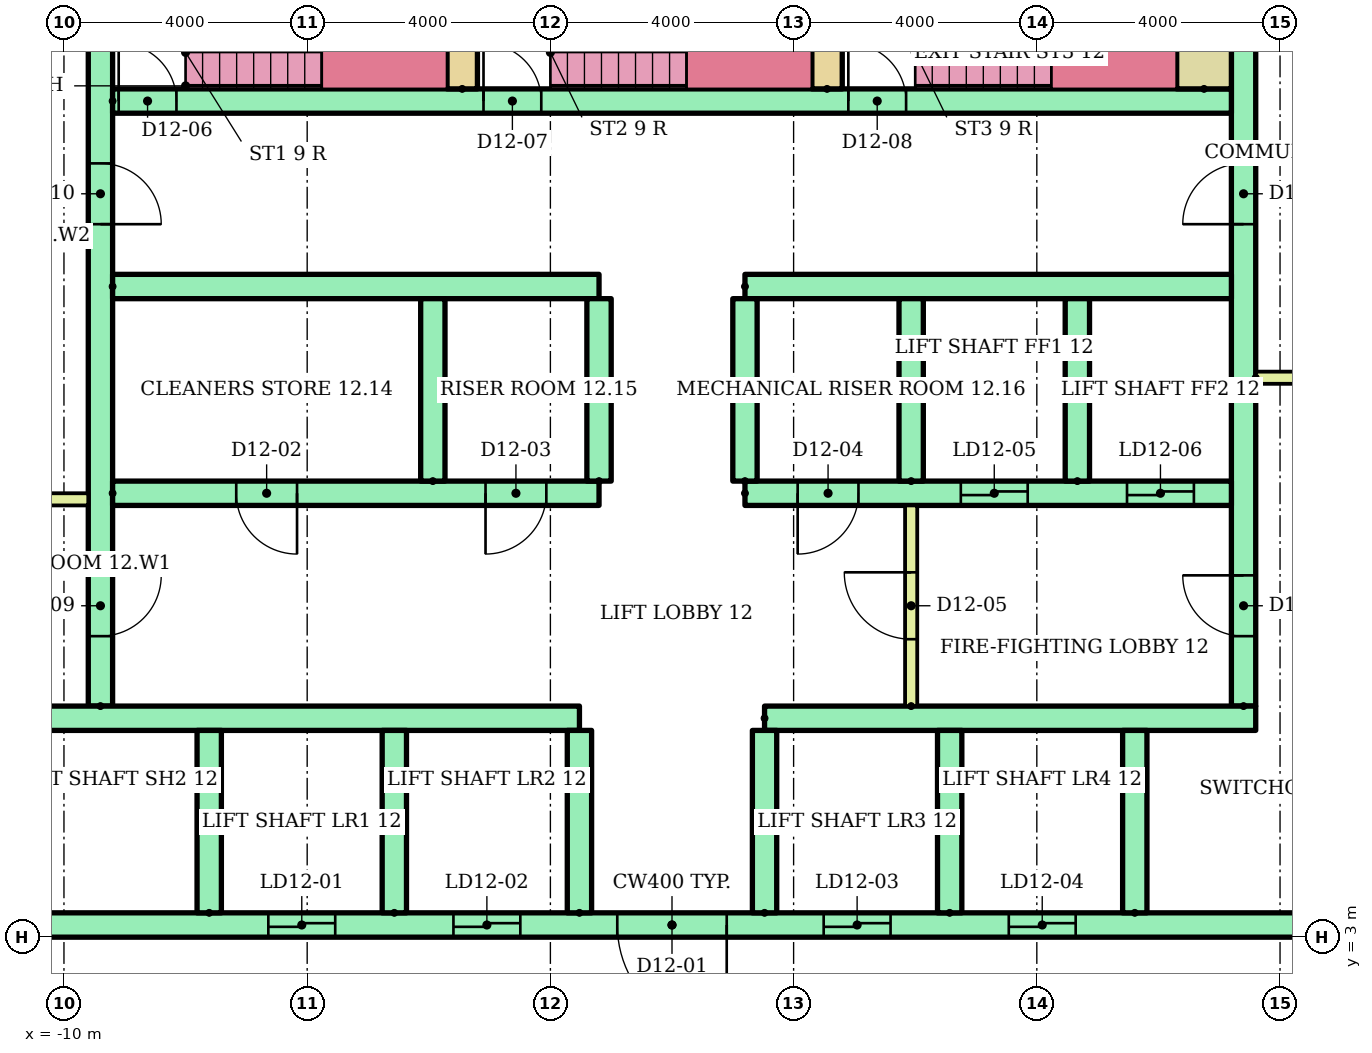
"""IFC4 building model, lengths in metres.
Left out: names, types, materials, properties, quantities, classifications, styles, units other than length and angle.
Written with IfcOpenShell. Run it as: python <this file> out.ifc"""

import sys

from ifc_helpers import new_model, si_unit, direction, frame, frame_2d, origin, place, context, subcontext, project, spatial, rectangle, extrude, element, fill, save


model = new_model("IFC4")
c1 = context("Model", 3, precision=1e-05, world=origin(), true_north=direction((0.0, 1.0)))
c2 = subcontext(c1, "Body", "Model", "MODEL_VIEW")
j1 = project(units=[si_unit("LENGTHUNIT", "METRE"), si_unit("PLANEANGLEUNIT", "RADIAN")], contexts=[c1])
p1 = place(None, origin())
s1 = spatial("IfcSite", under=j1, at=p1, CompositionType="ELEMENT")
p2 = place(p1, origin())
s2 = spatial("IfcBuilding", under=s1, at=p2, CompositionType="ELEMENT")
p3 = place(p2, frame((0.0, 0.0, 48.0)))
s3 = spatial("IfcBuildingStorey", under=s2, at=p3, CompositionType="ELEMENT", Elevation=48.0)
p4 = place(p3, frame((-9.4, 6.8, 0.0), z_axis=(0.0, 0.0, 1.0), x_axis=(0.0, 1.0, 0.0)))
e1 = element("IfcWall", 1, at=p4, inside=s3, PredefinedType="SHEAR", context=c2, shape_type="SweptSolid", body=[
    extrude(rectangle(XDim=12.7, YDim=0.4, at=frame_2d((6.35, 0.0))), origin(), (0.0, 0.0, 1.0), 2.92),
])
p5 = place(p4, frame((1.15, 0.0, 0.0)))
e2 = element("IfcOpeningElement", 2, at=p5, cuts=e1, PredefinedType="OPENING", context=c2, shape_type="SweptSolid", body=[
    extrude(rectangle(XDim=1.0, YDim=2.1, at=frame_2d((0.5, 1.05))), frame((0.0, 0.21, 0.0), z_axis=(0.0, -1.0, 0.0), x_axis=(1.0, 0.0, 0.0)), (0.0, 0.0, 1.0), 0.42),
])
p6 = place(p4, frame((7.925, 0.0, 0.0)))
e3 = element("IfcOpeningElement", 3, at=p6, cuts=e1, PredefinedType="OPENING", context=c2, shape_type="SweptSolid", body=[
    extrude(rectangle(XDim=1.0, YDim=2.1, at=frame_2d((0.5, 1.05))), frame((0.0, 0.21, 0.0), z_axis=(0.0, -1.0, 0.0), x_axis=(1.0, 0.0, 0.0)), (0.0, 0.0, 1.0), 0.42),
])
p7 = place(p3, frame((9.4, 6.8, 0.0), z_axis=(0.0, 0.0, 1.0), x_axis=(0.0, 1.0, 0.0)))
e4 = element("IfcWall", 4, at=p7, inside=s3, PredefinedType="SHEAR", context=c2, shape_type="SweptSolid", body=[
    extrude(rectangle(XDim=12.7, YDim=0.4, at=frame_2d((6.35, 0.0))), origin(), (0.0, 0.0, 1.0), 2.92),
])
p8 = place(p7, frame((1.15, 0.0, 0.0)))
e5 = element("IfcOpeningElement", 5, at=p8, cuts=e4, PredefinedType="OPENING", context=c2, shape_type="SweptSolid", body=[
    extrude(rectangle(XDim=1.0, YDim=2.1, at=frame_2d((0.5, 1.05))), frame((0.0, 0.21, 0.0), z_axis=(0.0, -1.0, 0.0), x_axis=(1.0, 0.0, 0.0)), (0.0, 0.0, 1.0), 0.42),
])
p9 = place(p7, frame((7.925, 0.0, 0.0)))
e6 = element("IfcOpeningElement", 6, at=p9, cuts=e4, PredefinedType="OPENING", context=c2, shape_type="SweptSolid", body=[
    extrude(rectangle(XDim=1.0, YDim=2.1, at=frame_2d((0.5, 1.05))), frame((0.0, 0.21, 0.0), z_axis=(0.0, -1.0, 0.0), x_axis=(1.0, 0.0, 0.0)), (0.0, 0.0, 1.0), 0.42),
])
p10 = place(p3, frame((-13.5, 3.2, 0.0)))
e7 = element("IfcWall", 7, at=p10, inside=s3, PredefinedType="SHEAR", context=c2, shape_type="SweptSolid", body=[
    extrude(rectangle(XDim=27.0, YDim=0.4, at=frame_2d((13.5, 0.0))), origin(), (0.0, 0.0, 1.0), 2.92),
])
p11 = place(p10, frame((6.861, 0.0, 0.0)))
e8 = element("IfcOpeningElement", 8, at=p11, cuts=e7, PredefinedType="OPENING", context=c2, shape_type="SweptSolid", body=[
    extrude(rectangle(XDim=1.1, YDim=2.1, at=frame_2d((0.55, 1.05))), frame((0.0, 0.21, 0.0), z_axis=(0.0, -1.0, 0.0), x_axis=(1.0, 0.0, 0.0)), (0.0, 0.0, 1.0), 0.42),
])
p12 = place(p10, frame((9.906, 0.0, 0.0)))
e9 = element("IfcOpeningElement", 9, at=p12, cuts=e7, PredefinedType="OPENING", context=c2, shape_type="SweptSolid", body=[
    extrude(rectangle(XDim=1.1, YDim=2.1, at=frame_2d((0.55, 1.05))), frame((0.0, 0.21, 0.0), z_axis=(0.0, -1.0, 0.0), x_axis=(1.0, 0.0, 0.0)), (0.0, 0.0, 1.0), 0.42),
])
p13 = place(p10, frame((15.994, 0.0, 0.0)))
e10 = element("IfcOpeningElement", 10, at=p13, cuts=e7, PredefinedType="OPENING", context=c2, shape_type="SweptSolid", body=[
    extrude(rectangle(XDim=1.1, YDim=2.1, at=frame_2d((0.55, 1.05))), frame((0.0, 0.21, 0.0), z_axis=(0.0, -1.0, 0.0), x_axis=(1.0, 0.0, 0.0)), (0.0, 0.0, 1.0), 0.42),
])
p14 = place(p10, frame((19.039, 0.0, 0.0)))
e11 = element("IfcOpeningElement", 11, at=p14, cuts=e7, PredefinedType="OPENING", context=c2, shape_type="SweptSolid", body=[
    extrude(rectangle(XDim=1.1, YDim=2.1, at=frame_2d((0.55, 1.05))), frame((0.0, 0.21, 0.0), z_axis=(0.0, -1.0, 0.0), x_axis=(1.0, 0.0, 0.0)), (0.0, 0.0, 1.0), 0.42),
])
p15 = place(p10, frame((12.6, 0.0, 0.0)))
e12 = element("IfcOpeningElement", 12, at=p15, cuts=e7, PredefinedType="OPENING", context=c2, shape_type="SweptSolid", body=[
    extrude(rectangle(XDim=1.8, YDim=2.1, at=frame_2d((0.9, 1.05))), frame((0.0, 0.21, 0.0), z_axis=(0.0, -1.0, 0.0), x_axis=(1.0, 0.0, 0.0)), (0.0, 0.0, 1.0), 0.42),
])
p16 = place(p3, frame((-13.5, 6.6, 0.0)))
e13 = element("IfcWall", 13, at=p16, inside=s3, PredefinedType="SHEAR", context=c2, shape_type="SweptSolid", body=[
    extrude(rectangle(XDim=11.978, YDim=0.4, at=frame_2d((5.989, 0.0))), origin(), (0.0, 0.0, 1.0), 2.92),
])
p17 = place(p3, frame((1.522, 6.6, 0.0)))
e14 = element("IfcWall", 14, at=p17, inside=s3, PredefinedType="SHEAR", context=c2, shape_type="SweptSolid", body=[
    extrude(rectangle(XDim=8.078, YDim=0.4, at=frame_2d((4.039, 0.0))), origin(), (0.0, 0.0, 1.0), 2.92),
])
for number, where, z_axis, x_axis in (
    (15, (-7.611, 3.4, 0.0), (0.0, 0.0, 1.0), (0.0, 1.0, 0.0)),
    (16, (-4.567, 3.4, 0.0), (0.0, 0.0, 1.0), (0.0, 1.0, 0.0)),
    (17, (-1.522, 3.4, 0.0), (0.0, 0.0, 1.0), (0.0, 1.0, 0.0)),
    (18, (1.522, 3.4, 0.0), (0.0, 0.0, 1.0), (0.0, 1.0, 0.0)),
    (19, (4.567, 3.4, 0.0), (0.0, 0.0, 1.0), (0.0, 1.0, 0.0)),
    (20, (7.611, 3.4, 0.0), (0.0, 0.0, 1.0), (0.0, 1.0, 0.0)),
):
    element("IfcWall", number, at=place(p3, frame(where, z_axis=z_axis, x_axis=x_axis)), inside=s3, PredefinedType="SHEAR", context=c2, shape_type="SweptSolid", body=[
        extrude(rectangle(XDim=3.0, YDim=0.4, at=frame_2d((1.5, 0.0))), origin(), (0.0, 0.0, 1.0), 2.92),
    ])
p18 = place(p3, frame((-9.2, 10.3, 0.0)))
e21 = element("IfcWall", 21, at=p18, inside=s3, PredefinedType="SHEAR", context=c2, shape_type="SweptSolid", body=[
    extrude(rectangle(XDim=8.0, YDim=0.4, at=frame_2d((4.0, 0.0))), origin(), (0.0, 0.0, 1.0), 2.92),
])
p19 = place(p18, frame((2.033, 0.0, 0.0)))
e22 = element("IfcOpeningElement", 22, at=p19, cuts=e21, PredefinedType="OPENING", context=c2, shape_type="SweptSolid", body=[
    extrude(rectangle(XDim=1.0, YDim=2.1, at=frame_2d((0.5, 1.05))), frame((0.0, 0.21, 0.0), z_axis=(0.0, -1.0, 0.0), x_axis=(1.0, 0.0, 0.0)), (0.0, 0.0, 1.0), 0.42),
])
p20 = place(p18, frame((6.133, 0.0, 0.0)))
e23 = element("IfcOpeningElement", 23, at=p20, cuts=e21, PredefinedType="OPENING", context=c2, shape_type="SweptSolid", body=[
    extrude(rectangle(XDim=1.0, YDim=2.1, at=frame_2d((0.5, 1.05))), frame((0.0, 0.21, 0.0), z_axis=(0.0, -1.0, 0.0), x_axis=(1.0, 0.0, 0.0)), (0.0, 0.0, 1.0), 0.42),
])
p21 = place(p3, frame((-9.2, 13.7, 0.0)))
e24 = element("IfcWall", 24, at=p21, inside=s3, PredefinedType="SHEAR", context=c2, shape_type="SweptSolid", body=[
    extrude(rectangle(XDim=8.0, YDim=0.4, at=frame_2d((4.0, 0.0))), origin(), (0.0, 0.0, 1.0), 2.92),
])
p22 = place(p3, frame((1.2, 10.3, 0.0)))
e25 = element("IfcWall", 25, at=p22, inside=s3, PredefinedType="SHEAR", context=c2, shape_type="SweptSolid", body=[
    extrude(rectangle(XDim=8.0, YDim=0.4, at=frame_2d((4.0, 0.0))), origin(), (0.0, 0.0, 1.0), 2.92),
])
p23 = place(p22, frame((3.55, 0.0, 0.0)))
e26 = element("IfcOpeningElement", 26, at=p23, cuts=e25, PredefinedType="OPENING", context=c2, shape_type="SweptSolid", body=[
    extrude(rectangle(XDim=1.1, YDim=2.1, at=frame_2d((0.55, 1.05))), frame((0.0, 0.21, 0.0), z_axis=(0.0, -1.0, 0.0), x_axis=(1.0, 0.0, 0.0)), (0.0, 0.0, 1.0), 0.42),
])
p24 = place(p22, frame((6.283, 0.0, 0.0)))
e27 = element("IfcOpeningElement", 27, at=p24, cuts=e25, PredefinedType="OPENING", context=c2, shape_type="SweptSolid", body=[
    extrude(rectangle(XDim=1.1, YDim=2.1, at=frame_2d((0.55, 1.05))), frame((0.0, 0.21, 0.0), z_axis=(0.0, -1.0, 0.0), x_axis=(1.0, 0.0, 0.0)), (0.0, 0.0, 1.0), 0.42),
])
p25 = place(p22, frame((0.867, 0.0, 0.0)))
e28 = element("IfcOpeningElement", 28, at=p25, cuts=e25, PredefinedType="OPENING", context=c2, shape_type="SweptSolid", body=[
    extrude(rectangle(XDim=1.0, YDim=2.1, at=frame_2d((0.5, 1.05))), frame((0.0, 0.21, 0.0), z_axis=(0.0, -1.0, 0.0), x_axis=(1.0, 0.0, 0.0)), (0.0, 0.0, 1.0), 0.42),
])
p26 = place(p3, frame((1.2, 13.7, 0.0)))
e29 = element("IfcWall", 29, at=p26, inside=s3, PredefinedType="SHEAR", context=c2, shape_type="SweptSolid", body=[
    extrude(rectangle(XDim=8.0, YDim=0.4, at=frame_2d((4.0, 0.0))), origin(), (0.0, 0.0, 1.0), 2.92),
])
for number, where, z_axis, x_axis in (
    (30, (-3.933, 10.5, 0.0), (0.0, 0.0, 1.0), (0.0, 1.0, 0.0)),
    (31, (-1.2, 10.5, 0.0), (0.0, 0.0, 1.0), (0.0, 1.0, 0.0)),
    (32, (1.2, 10.5, 0.0), (0.0, 0.0, 1.0), (0.0, 1.0, 0.0)),
    (33, (3.933, 10.5, 0.0), (0.0, 0.0, 1.0), (0.0, 1.0, 0.0)),
    (34, (6.667, 10.5, 0.0), (0.0, 0.0, 1.0), (0.0, 1.0, 0.0)),
):
    element("IfcWall", number, at=place(p3, frame(where, z_axis=z_axis, x_axis=x_axis)), inside=s3, PredefinedType="SHEAR", context=c2, shape_type="SweptSolid", body=[
        extrude(rectangle(XDim=3.0, YDim=0.4, at=frame_2d((1.5, 0.0))), origin(), (0.0, 0.0, 1.0), 2.92),
    ])
p27 = place(p3, frame((3.933, 6.8, 0.0), z_axis=(0.0, 0.0, 1.0), x_axis=(0.0, 1.0, 0.0)))
e35 = element("IfcWall", 35, at=p27, inside=s3, PredefinedType="PARTITIONING", context=c2, shape_type="SweptSolid", body=[
    extrude(rectangle(XDim=3.3, YDim=0.2, at=frame_2d((1.65, 0.0))), origin(), (0.0, 0.0, 1.0), 2.92),
])
p28 = place(p27, frame((1.1, 0.0, 0.0)))
e36 = element("IfcOpeningElement", 36, at=p28, cuts=e35, PredefinedType="OPENING", context=c2, shape_type="SweptSolid", body=[
    extrude(rectangle(XDim=1.1, YDim=2.1, at=frame_2d((0.55, 1.05))), frame((0.0, 0.11, 0.0), z_axis=(0.0, -1.0, 0.0), x_axis=(1.0, 0.0, 0.0)), (0.0, 0.0, 1.0), 0.22),
])
p29 = place(p3, frame((-9.2, 16.75, 0.0)))
e37 = element("IfcWall", 37, at=p29, inside=s3, PredefinedType="SHEAR", context=c2, shape_type="SweptSolid", body=[
    extrude(rectangle(XDim=18.4, YDim=0.4, at=frame_2d((9.2, 0.0))), origin(), (0.0, 0.0, 1.0), 2.92),
])
p30 = place(p29, frame((0.1, 0.0, 0.0)))
e38 = element("IfcOpeningElement", 38, at=p30, cuts=e37, PredefinedType="OPENING", context=c2, shape_type="SweptSolid", body=[
    extrude(rectangle(XDim=0.95, YDim=2.1, at=frame_2d((0.475, 1.05))), frame((0.0, 0.21, 0.0), z_axis=(0.0, -1.0, 0.0), x_axis=(1.0, 0.0, 0.0)), (0.0, 0.0, 1.0), 0.42),
])
p31 = place(p29, frame((6.1, 0.0, 0.0)))
e39 = element("IfcOpeningElement", 39, at=p31, cuts=e37, PredefinedType="OPENING", context=c2, shape_type="SweptSolid", body=[
    extrude(rectangle(XDim=0.95, YDim=2.1, at=frame_2d((0.475, 1.05))), frame((0.0, 0.21, 0.0), z_axis=(0.0, -1.0, 0.0), x_axis=(1.0, 0.0, 0.0)), (0.0, 0.0, 1.0), 0.42),
])
p32 = place(p29, frame((12.1, 0.0, 0.0)))
e40 = element("IfcOpeningElement", 40, at=p32, cuts=e37, PredefinedType="OPENING", context=c2, shape_type="SweptSolid", body=[
    extrude(rectangle(XDim=0.95, YDim=2.1, at=frame_2d((0.475, 1.05))), frame((0.0, 0.21, 0.0), z_axis=(0.0, -1.0, 0.0), x_axis=(1.0, 0.0, 0.0)), (0.0, 0.0, 1.0), 0.42),
])
for number, where, z_axis, x_axis in (
    (41, (-3.45, 16.95, 0.0), (0.0, 0.0, 1.0), (0.0, 1.0, 0.0)),
    (42, (2.55, 16.95, 0.0), (0.0, 0.0, 1.0), (0.0, 1.0, 0.0)),
):
    element("IfcWall", number, at=place(p3, frame(where, z_axis=z_axis, x_axis=x_axis)), inside=s3, PredefinedType="SHEAR", context=c2, shape_type="SweptSolid", body=[
        extrude(rectangle(XDim=2.55, YDim=0.5, at=frame_2d((1.275, 0.0))), origin(), (0.0, 0.0, 1.0), 2.92),
    ])
p33 = place(p3, frame((8.75, 16.95, 0.0), z_axis=(0.0, 0.0, 1.0), x_axis=(0.0, 1.0, 0.0)))
e43 = element("IfcWall", 43, at=p33, inside=s3, PredefinedType="SHEAR", context=c2, shape_type="SweptSolid", body=[
    extrude(rectangle(XDim=2.55, YDim=0.9, at=frame_2d((1.275, 0.0))), origin(), (0.0, 0.0, 1.0), 2.92),
])
for number, where in (
    (44, (-13.5, 10.2, 0.0)),
    (45, (9.6, 12.2, 0.0)),
):
    element("IfcWall", number, at=place(p3, frame(where)), inside=s3, PredefinedType="PARTITIONING", context=c2, shape_type="SweptSolid", body=[
        extrude(rectangle(XDim=3.9, YDim=0.2, at=frame_2d((1.95, 0.0))), origin(), (0.0, 0.0, 1.0), 2.92),
    ])
p34 = place(p11, origin())
e46 = element("IfcDoor", 46, at=p34, inside=s3, OperationType="SLIDING_TO_LEFT", PredefinedType="DOOR", context=c2, shape_type="SweptSolid", body=[
    extrude(rectangle(XDim=1.1, YDim=2.1, at=frame_2d((0.55, 1.05))), frame((0.0, 0.025, 0.0), z_axis=(0.0, -1.0, 0.0), x_axis=(1.0, 0.0, 0.0)), (0.0, 0.0, 1.0), 0.05),
])
fill(e8, e46)
p35 = place(p12, origin())
e47 = element("IfcDoor", 47, at=p35, inside=s3, OperationType="SLIDING_TO_LEFT", PredefinedType="DOOR", context=c2, shape_type="SweptSolid", body=[
    extrude(rectangle(XDim=1.1, YDim=2.1, at=frame_2d((0.55, 1.05))), frame((0.0, 0.025, 0.0), z_axis=(0.0, -1.0, 0.0), x_axis=(1.0, 0.0, 0.0)), (0.0, 0.0, 1.0), 0.05),
])
fill(e9, e47)
p36 = place(p13, origin())
e48 = element("IfcDoor", 48, at=p36, inside=s3, OperationType="SLIDING_TO_LEFT", PredefinedType="DOOR", context=c2, shape_type="SweptSolid", body=[
    extrude(rectangle(XDim=1.1, YDim=2.1, at=frame_2d((0.55, 1.05))), frame((0.0, 0.025, 0.0), z_axis=(0.0, -1.0, 0.0), x_axis=(1.0, 0.0, 0.0)), (0.0, 0.0, 1.0), 0.05),
])
fill(e10, e48)
p37 = place(p14, origin())
e49 = element("IfcDoor", 49, at=p37, inside=s3, OperationType="SLIDING_TO_LEFT", PredefinedType="DOOR", context=c2, shape_type="SweptSolid", body=[
    extrude(rectangle(XDim=1.1, YDim=2.1, at=frame_2d((0.55, 1.05))), frame((0.0, 0.025, 0.0), z_axis=(0.0, -1.0, 0.0), x_axis=(1.0, 0.0, 0.0)), (0.0, 0.0, 1.0), 0.05),
])
fill(e11, e49)
p38 = place(p15, frame((1.8, 0.0, 0.0), z_axis=(0.0, 0.0, 1.0), x_axis=(-1.0, 0.0, 0.0)))
e50 = element("IfcDoor", 50, at=p38, inside=s3, OperationType="DOUBLE_DOOR_SINGLE_SWING", PredefinedType="DOOR", context=c2, shape_type="SweptSolid", body=[
    extrude(rectangle(XDim=1.8, YDim=2.1, at=frame_2d((0.9, 1.05))), frame((0.0, 0.025, 0.0), z_axis=(0.0, -1.0, 0.0), x_axis=(1.0, 0.0, 0.0)), (0.0, 0.0, 1.0), 0.05),
])
fill(e12, e50)
p39 = place(p23, origin())
e51 = element("IfcDoor", 51, at=p39, inside=s3, OperationType="SLIDING_TO_LEFT", PredefinedType="DOOR", context=c2, shape_type="SweptSolid", body=[
    extrude(rectangle(XDim=1.1, YDim=2.1, at=frame_2d((0.55, 1.05))), frame((0.0, 0.025, 0.0), z_axis=(0.0, -1.0, 0.0), x_axis=(1.0, 0.0, 0.0)), (0.0, 0.0, 1.0), 0.05),
])
fill(e26, e51)
p40 = place(p24, origin())
e52 = element("IfcDoor", 52, at=p40, inside=s3, OperationType="SLIDING_TO_LEFT", PredefinedType="DOOR", context=c2, shape_type="SweptSolid", body=[
    extrude(rectangle(XDim=1.1, YDim=2.1, at=frame_2d((0.55, 1.05))), frame((0.0, 0.025, 0.0), z_axis=(0.0, -1.0, 0.0), x_axis=(1.0, 0.0, 0.0)), (0.0, 0.0, 1.0), 0.05),
])
fill(e27, e52)
p41 = place(p19, frame((1.0, 0.0, 0.0), z_axis=(0.0, 0.0, 1.0), x_axis=(-1.0, 0.0, 0.0)))
e53 = element("IfcDoor", 53, at=p41, inside=s3, OperationType="SINGLE_SWING_RIGHT", PredefinedType="DOOR", context=c2, shape_type="SweptSolid", body=[
    extrude(rectangle(XDim=1.0, YDim=2.1, at=frame_2d((0.5, 1.05))), frame((0.0, 0.025, 0.0), z_axis=(0.0, -1.0, 0.0), x_axis=(1.0, 0.0, 0.0)), (0.0, 0.0, 1.0), 0.05),
])
fill(e22, e53)
p42 = place(p20, frame((1.0, 0.0, 0.0), z_axis=(0.0, 0.0, 1.0), x_axis=(-1.0, 0.0, 0.0)))
e54 = element("IfcDoor", 54, at=p42, inside=s3, OperationType="SINGLE_SWING_LEFT", PredefinedType="DOOR", context=c2, shape_type="SweptSolid", body=[
    extrude(rectangle(XDim=1.0, YDim=2.1, at=frame_2d((0.5, 1.05))), frame((0.0, 0.025, 0.0), z_axis=(0.0, -1.0, 0.0), x_axis=(1.0, 0.0, 0.0)), (0.0, 0.0, 1.0), 0.05),
])
fill(e23, e54)
p43 = place(p25, frame((1.0, 0.0, 0.0), z_axis=(0.0, 0.0, 1.0), x_axis=(-1.0, 0.0, 0.0)))
e55 = element("IfcDoor", 55, at=p43, inside=s3, OperationType="SINGLE_SWING_LEFT", PredefinedType="DOOR", context=c2, shape_type="SweptSolid", body=[
    extrude(rectangle(XDim=1.0, YDim=2.1, at=frame_2d((0.5, 1.05))), frame((0.0, 0.025, 0.0), z_axis=(0.0, -1.0, 0.0), x_axis=(1.0, 0.0, 0.0)), (0.0, 0.0, 1.0), 0.05),
])
fill(e28, e55)
p44 = place(p28, origin())
e56 = element("IfcDoor", 56, at=p44, inside=s3, OperationType="SINGLE_SWING_RIGHT", PredefinedType="DOOR", context=c2, shape_type="SweptSolid", body=[
    extrude(rectangle(XDim=1.1, YDim=2.1, at=frame_2d((0.55, 1.05))), frame((0.0, 0.025, 0.0), z_axis=(0.0, -1.0, 0.0), x_axis=(1.0, 0.0, 0.0)), (0.0, 0.0, 1.0), 0.05),
])
fill(e36, e56)
p45 = place(p30, origin())
e57 = element("IfcDoor", 57, at=p45, inside=s3, OperationType="SINGLE_SWING_LEFT", PredefinedType="DOOR", context=c2, shape_type="SweptSolid", body=[
    extrude(rectangle(XDim=0.95, YDim=2.1, at=frame_2d((0.475, 1.05))), frame((0.0, 0.025, 0.0), z_axis=(0.0, -1.0, 0.0), x_axis=(1.0, 0.0, 0.0)), (0.0, 0.0, 1.0), 0.05),
])
fill(e38, e57)
p46 = place(p31, origin())
e58 = element("IfcDoor", 58, at=p46, inside=s3, OperationType="SINGLE_SWING_LEFT", PredefinedType="DOOR", context=c2, shape_type="SweptSolid", body=[
    extrude(rectangle(XDim=0.95, YDim=2.1, at=frame_2d((0.475, 1.05))), frame((0.0, 0.025, 0.0), z_axis=(0.0, -1.0, 0.0), x_axis=(1.0, 0.0, 0.0)), (0.0, 0.0, 1.0), 0.05),
])
fill(e39, e58)
p47 = place(p32, origin())
e59 = element("IfcDoor", 59, at=p47, inside=s3, OperationType="SINGLE_SWING_LEFT", PredefinedType="DOOR", context=c2, shape_type="SweptSolid", body=[
    extrude(rectangle(XDim=0.95, YDim=2.1, at=frame_2d((0.475, 1.05))), frame((0.0, 0.025, 0.0), z_axis=(0.0, -1.0, 0.0), x_axis=(1.0, 0.0, 0.0)), (0.0, 0.0, 1.0), 0.05),
])
fill(e40, e59)
p48 = place(p5, frame((1.0, 0.0, 0.0), z_axis=(0.0, 0.0, 1.0), x_axis=(-1.0, 0.0, 0.0)))
e60 = element("IfcDoor", 60, at=p48, inside=s3, OperationType="SINGLE_SWING_RIGHT", PredefinedType="DOOR", context=c2, shape_type="SweptSolid", body=[
    extrude(rectangle(XDim=1.0, YDim=2.1, at=frame_2d((0.5, 1.05))), frame((0.0, 0.025, 0.0), z_axis=(0.0, -1.0, 0.0), x_axis=(1.0, 0.0, 0.0)), (0.0, 0.0, 1.0), 0.05),
])
fill(e2, e60)
p49 = place(p6, frame((1.0, 0.0, 0.0), z_axis=(0.0, 0.0, 1.0), x_axis=(-1.0, 0.0, 0.0)))
e61 = element("IfcDoor", 61, at=p49, inside=s3, OperationType="SINGLE_SWING_LEFT", PredefinedType="DOOR", context=c2, shape_type="SweptSolid", body=[
    extrude(rectangle(XDim=1.0, YDim=2.1, at=frame_2d((0.5, 1.05))), frame((0.0, 0.025, 0.0), z_axis=(0.0, -1.0, 0.0), x_axis=(1.0, 0.0, 0.0)), (0.0, 0.0, 1.0), 0.05),
])
fill(e3, e61)
p50 = place(p8, origin())
e62 = element("IfcDoor", 62, at=p50, inside=s3, OperationType="SINGLE_SWING_RIGHT", PredefinedType="DOOR", context=c2, shape_type="SweptSolid", body=[
    extrude(rectangle(XDim=1.0, YDim=2.1, at=frame_2d((0.5, 1.05))), frame((0.0, 0.025, 0.0), z_axis=(0.0, -1.0, 0.0), x_axis=(1.0, 0.0, 0.0)), (0.0, 0.0, 1.0), 0.05),
])
fill(e5, e62)
p51 = place(p9, origin())
e63 = element("IfcDoor", 63, at=p51, inside=s3, OperationType="SINGLE_SWING_LEFT", PredefinedType="DOOR", context=c2, shape_type="SweptSolid", body=[
    extrude(rectangle(XDim=1.0, YDim=2.1, at=frame_2d((0.5, 1.05))), frame((0.0, 0.025, 0.0), z_axis=(0.0, -1.0, 0.0), x_axis=(1.0, 0.0, 0.0)), (0.0, 0.0, 1.0), 0.05),
])
fill(e6, e63)
save(model, sys.argv[1])
